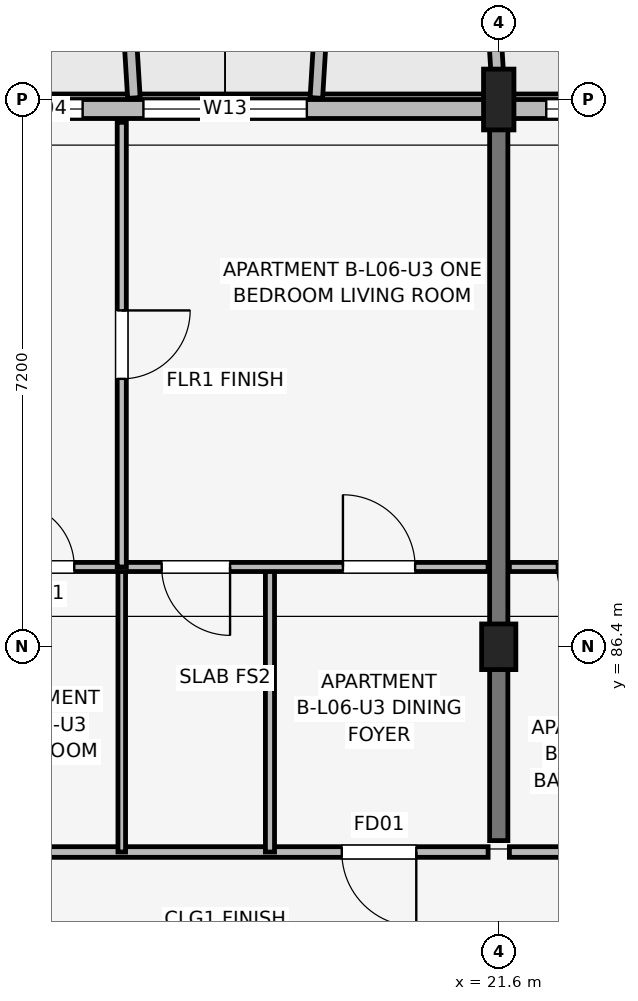
"""IFC4 building model, lengths in metres.
Left out: names, types, materials, properties, quantities, classifications, styles, units other than length and angle.
Written with IfcOpenShell. Run it as: python <this file> out.ifc"""

import sys

from ifc_helpers import new_model, si_unit, direction, frame, frame_2d, origin, origin_2d, place, context, subcontext, project, spatial, rectangle, extrude, element, fill, save


model = new_model("IFC4")
c1 = context("Model", 3, precision=1e-05, world=origin(), true_north=direction((0.0, 1.0)))
c2 = subcontext(c1, "Body", "Model", "MODEL_VIEW")
j1 = project(units=[si_unit("LENGTHUNIT", "METRE"), si_unit("PLANEANGLEUNIT", "RADIAN")], contexts=[c1])
p1 = place(None, origin())
s1 = spatial("IfcSite", under=j1, at=p1, CompositionType="ELEMENT")
p2 = place(p1, origin())
s2 = spatial("IfcBuilding", under=s1, at=p2, CompositionType="ELEMENT")
p3 = place(p2, frame((0.0, 0.0, 21.3)))
s3 = spatial("IfcBuildingStorey", under=s2, at=p3, CompositionType="ELEMENT", Elevation=21.3)
p4 = place(p3, frame((21.6, 86.4, 0.0), z_axis=(0.0, 0.0, 1.0), x_axis=(1.0, 0.0, 0.0)))
e1 = element("IfcColumn", 1, at=p4, inside=s3, PredefinedType="COLUMN", context=c2, shape_type="SweptSolid", body=[
    extrude(rectangle(XDim=0.45, YDim=0.6, at=origin_2d()), origin(), (0.0, 0.0, 1.0), 3.15),
])
p5 = place(p3, frame((21.6, 93.6, 0.0), z_axis=(0.0, 0.0, 1.0), x_axis=(1.0, 0.0, 0.0)))
e2 = element("IfcColumn", 2, at=p5, inside=s3, PredefinedType="COLUMN", context=c2, shape_type="SweptSolid", body=[
    extrude(rectangle(XDim=0.4, YDim=0.8, at=origin_2d()), origin(), (0.0, 0.0, 1.0), 3.15),
])
p6 = place(p3, frame((21.6, 83.85, 0.0), z_axis=(0.0, 0.0, 1.0), x_axis=(0.0, 1.0, 0.0)))
e3 = element("IfcWall", 3, at=p6, inside=s3, PredefinedType="SHEAR", context=c2, shape_type="SweptSolid", body=[
    extrude(rectangle(XDim=9.4, YDim=0.24, at=frame_2d((4.7, 0.0))), origin(), (0.0, 0.0, 1.0), 3.15),
])
p7 = place(p3, frame((32.8, 93.475, 0.0), z_axis=(0.0, 0.0, 1.0), x_axis=(-1.0, 0.0, 0.0)))
e4 = element("IfcWall", 4, at=p7, inside=s3, PredefinedType="SOLIDWALL", context=c2, shape_type="SweptSolid", body=[
    extrude(rectangle(XDim=29.6, YDim=0.25, at=frame_2d((14.8, 0.0))), origin(), (0.0, 0.0, 1.0), 2.43),
])
p8 = place(p7, frame((22.9, 0.0, 0.0), z_axis=(0.0, 0.0, 1.0), x_axis=(-1.0, 0.0, 0.0)))
e5 = element("IfcOpeningElement", 5, at=p8, cuts=e4, PredefinedType="OPENING", context=c2, shape_type="SweptSolid", body=[
    extrude(rectangle(XDim=1.8, YDim=2.15, at=frame_2d((0.9, 1.075))), frame((0.0, 0.135, 0.0), z_axis=(0.0, -1.0, 0.0), x_axis=(1.0, 0.0, 0.0)), (0.0, 0.0, 1.0), 0.27),
])
p9 = place(p7, frame((8.425, 0.0, 0.0), z_axis=(0.0, 0.0, 1.0), x_axis=(-1.0, 0.0, 0.0)))
e6 = element("IfcOpeningElement", 6, at=p9, cuts=e4, PredefinedType="OPENING", context=c2, shape_type="SweptSolid", body=[
    extrude(rectangle(XDim=1.65, YDim=2.15, at=frame_2d((0.825, 1.075))), frame((0.0, 0.135, 0.0), z_axis=(0.0, -1.0, 0.0), x_axis=(1.0, 0.0, 0.0)), (0.0, 0.0, 1.0), 0.27),
])
p10 = place(p7, frame((26.25, 0.0, 0.75)))
e7 = element("IfcOpeningElement", 7, at=p10, cuts=e4, PredefinedType="OPENING", context=c2, shape_type="SweptSolid", body=[
    extrude(rectangle(XDim=0.72, YDim=1.35, at=frame_2d((0.36, 0.675))), frame((0.0, 0.135, 0.0), z_axis=(0.0, -1.0, 0.0), x_axis=(1.0, 0.0, 0.0)), (0.0, 0.0, 1.0), 0.27),
])
p11 = place(p7, frame((24.065, 0.0, 0.75)))
e8 = element("IfcOpeningElement", 8, at=p11, cuts=e4, PredefinedType="OPENING", context=c2, shape_type="SweptSolid", body=[
    extrude(rectangle(XDim=0.85, YDim=1.4, at=frame_2d((0.425, 0.7))), frame((0.0, 0.135, 0.0), z_axis=(0.0, -1.0, 0.0), x_axis=(1.0, 0.0, 0.0)), (0.0, 0.0, 1.0), 0.27),
])
p12 = place(p7, frame((16.675, 0.0, 0.75)))
e9 = element("IfcOpeningElement", 9, at=p12, cuts=e4, PredefinedType="OPENING", context=c2, shape_type="SweptSolid", body=[
    extrude(rectangle(XDim=0.98, YDim=1.45, at=frame_2d((0.49, 0.725))), frame((0.0, 0.135, 0.0), z_axis=(0.0, -1.0, 0.0), x_axis=(1.0, 0.0, 0.0)), (0.0, 0.0, 1.0), 0.27),
])
p13 = place(p7, frame((13.725, 0.0, 0.67)))
e10 = element("IfcOpeningElement", 10, at=p13, cuts=e4, PredefinedType="OPENING", context=c2, shape_type="SweptSolid", body=[
    extrude(rectangle(XDim=2.15, YDim=1.65, at=frame_2d((1.075, 0.825))), frame((0.0, 0.135, 0.0), z_axis=(0.0, -1.0, 0.0), x_axis=(1.0, 0.0, 0.0)), (0.0, 0.0, 1.0), 0.27),
])
p14 = place(p7, frame((9.355, 0.0, 0.75)))
e11 = element("IfcOpeningElement", 11, at=p14, cuts=e4, PredefinedType="OPENING", context=c2, shape_type="SweptSolid", body=[
    extrude(rectangle(XDim=1.22, YDim=1.5, at=frame_2d((0.61, 0.75))), frame((0.0, 0.135, 0.0), z_axis=(0.0, -1.0, 0.0), x_axis=(1.0, 0.0, 0.0)), (0.0, 0.0, 1.0), 0.27),
])
p15 = place(p7, frame((1.89, 0.0, 0.7)))
e12 = element("IfcOpeningElement", 12, at=p15, cuts=e4, PredefinedType="OPENING", context=c2, shape_type="SweptSolid", body=[
    extrude(rectangle(XDim=1.58, YDim=1.6, at=frame_2d((0.79, 0.8))), frame((0.0, 0.135, 0.0), z_axis=(0.0, -1.0, 0.0), x_axis=(1.0, 0.0, 0.0)), (0.0, 0.0, 1.0), 0.27),
])
for number, where, z_axis, x_axis in (
    (13, (16.8, 93.62, 0.0), (0.0, 0.0, 1.0), (-0.061, 0.998, 0.0)),
    (14, (19.2, 93.62, 0.0), (0.0, 0.0, 1.0), (0.061, 0.998, 0.0)),
    (15, (21.6, 93.62, 0.0), (0.0, 0.0, 1.0), (-0.061, 0.998, 0.0)),
):
    element("IfcWall", number, at=place(p3, frame(where, z_axis=z_axis, x_axis=x_axis)), inside=s3, PredefinedType="ELEMENTEDWALL", context=c2, shape_type="SweptSolid", body=[
        extrude(rectangle(XDim=1.964, YDim=0.165, at=frame_2d((0.982, 0.0))), origin(), (0.0, 0.0, 1.0), 2.53),
    ])
p16 = place(p3, frame((14.54, 83.7, 0.0), z_axis=(0.0, 0.0, 1.0), x_axis=(1.0, 0.0, 0.0)))
e16 = element("IfcWall", 16, at=p16, inside=s3, PredefinedType="PARTITIONING", context=c2, shape_type="SweptSolid", body=[
    extrude(rectangle(XDim=6.92, YDim=0.14, at=frame_2d((3.46, 0.0))), origin(), (0.0, 0.0, 1.0), 2.38),
])
p17 = place(p16, frame((5.975, 0.0, 0.0), z_axis=(0.0, 0.0, 1.0), x_axis=(-1.0, 0.0, 0.0)))
e17 = element("IfcOpeningElement", 17, at=p17, cuts=e16, PredefinedType="OPENING", context=c2, shape_type="SweptSolid", body=[
    extrude(rectangle(XDim=0.98, YDim=2.1, at=frame_2d((0.49, 1.05))), frame((0.0, 0.08, 0.0), z_axis=(0.0, -1.0, 0.0), x_axis=(1.0, 0.0, 0.0)), (0.0, 0.0, 1.0), 0.16),
])
p18 = place(p3, frame((16.64, 83.7, 0.0), z_axis=(0.0, 0.0, 1.0), x_axis=(0.0, 1.0, 0.0)))
e18 = element("IfcWall", 18, at=p18, inside=s3, PredefinedType="PARTITIONING", context=c2, shape_type="SweptSolid", body=[
    extrude(rectangle(XDim=3.75, YDim=0.1, at=frame_2d((1.875, 0.0))), origin(), (0.0, 0.0, 1.0), 2.38),
])
p19 = place(p3, frame((18.59, 83.7, 0.0), z_axis=(0.0, 0.0, 1.0), x_axis=(0.0, 1.0, 0.0)))
e19 = element("IfcWall", 19, at=p19, inside=s3, PredefinedType="PARTITIONING", context=c2, shape_type="SweptSolid", body=[
    extrude(rectangle(XDim=3.75, YDim=0.12, at=frame_2d((1.875, 0.0))), origin(), (0.0, 0.0, 1.0), 2.38),
])
p20 = place(p3, frame((14.54, 87.45, 0.0), z_axis=(0.0, 0.0, 1.0), x_axis=(1.0, 0.0, 0.0)))
e20 = element("IfcWall", 20, at=p20, inside=s3, PredefinedType="PARTITIONING", context=c2, shape_type="SweptSolid", body=[
    extrude(rectangle(XDim=6.92, YDim=0.12, at=frame_2d((3.46, 0.0))), origin(), (0.0, 0.0, 1.0), 2.38),
])
p21 = place(p20, frame((0.625, 0.0, 0.0)))
e21 = element("IfcOpeningElement", 21, at=p21, cuts=e20, PredefinedType="OPENING", context=c2, shape_type="SweptSolid", body=[
    extrude(rectangle(XDim=0.85, YDim=2.08, at=frame_2d((0.425, 1.04))), frame((0.0, 0.07, 0.0), z_axis=(0.0, -1.0, 0.0), x_axis=(1.0, 0.0, 0.0)), (0.0, 0.0, 1.0), 0.14),
])
p22 = place(p20, frame((3.525, 0.0, 0.0), z_axis=(0.0, 0.0, 1.0), x_axis=(-1.0, 0.0, 0.0)))
e22 = element("IfcOpeningElement", 22, at=p22, cuts=e20, PredefinedType="OPENING", context=c2, shape_type="SweptSolid", body=[
    extrude(rectangle(XDim=0.9, YDim=2.08, at=frame_2d((0.45, 1.04))), frame((0.0, 0.07, 0.0), z_axis=(0.0, -1.0, 0.0), x_axis=(1.0, 0.0, 0.0)), (0.0, 0.0, 1.0), 0.14),
])
p23 = place(p20, frame((5.01, 0.0, 0.0)))
e23 = element("IfcOpeningElement", 23, at=p23, cuts=e20, PredefinedType="OPENING", context=c2, shape_type="SweptSolid", body=[
    extrude(rectangle(XDim=0.95, YDim=2.08, at=frame_2d((0.475, 1.04))), frame((0.0, 0.07, 0.0), z_axis=(0.0, -1.0, 0.0), x_axis=(1.0, 0.0, 0.0)), (0.0, 0.0, 1.0), 0.14),
])
p24 = place(p3, frame((16.64, 87.45, 0.0), z_axis=(0.0, 0.0, 1.0), x_axis=(0.0, 1.0, 0.0)))
e24 = element("IfcWall", 24, at=p24, inside=s3, PredefinedType="PARTITIONING", context=c2, shape_type="SweptSolid", body=[
    extrude(rectangle(XDim=5.85, YDim=0.12, at=frame_2d((2.925, 0.0))), origin(), (0.0, 0.0, 1.0), 2.38),
])
p25 = place(p24, frame((3.375, 0.0, 0.0), z_axis=(0.0, 0.0, 1.0), x_axis=(-1.0, 0.0, 0.0)))
e25 = element("IfcOpeningElement", 25, at=p25, cuts=e24, PredefinedType="OPENING", context=c2, shape_type="SweptSolid", body=[
    extrude(rectangle(XDim=0.9, YDim=2.08, at=frame_2d((0.45, 1.04))), frame((0.0, 0.07, 0.0), z_axis=(0.0, -1.0, 0.0), x_axis=(1.0, 0.0, 0.0)), (0.0, 0.0, 1.0), 0.14),
])
p26 = place(p3, frame((21.74, 83.7, 0.0), z_axis=(0.0, 0.0, 1.0), x_axis=(1.0, 0.0, 0.0)))
e26 = element("IfcWall", 26, at=p26, inside=s3, PredefinedType="PARTITIONING", context=c2, shape_type="SweptSolid", body=[
    extrude(rectangle(XDim=6.92, YDim=0.14, at=frame_2d((3.46, 0.0))), origin(), (0.0, 0.0, 1.0), 2.38),
])
p27 = place(p26, frame((5.145, 0.0, 0.0)))
e27 = element("IfcOpeningElement", 27, at=p27, cuts=e26, PredefinedType="OPENING", context=c2, shape_type="SweptSolid", body=[
    extrude(rectangle(XDim=0.98, YDim=2.1, at=frame_2d((0.49, 1.05))), frame((0.0, 0.08, 0.0), z_axis=(0.0, -1.0, 0.0), x_axis=(1.0, 0.0, 0.0)), (0.0, 0.0, 1.0), 0.16),
])
p28 = place(p3, frame((21.74, 87.45, 0.0), z_axis=(0.0, 0.0, 1.0), x_axis=(1.0, 0.0, 0.0)))
e28 = element("IfcWall", 28, at=p28, inside=s3, PredefinedType="PARTITIONING", context=c2, shape_type="SweptSolid", body=[
    extrude(rectangle(XDim=6.92, YDim=0.12, at=frame_2d((3.46, 0.0))), origin(), (0.0, 0.0, 1.0), 2.38),
])
p29 = place(p28, frame((1.475, 0.0, 0.0), z_axis=(0.0, 0.0, 1.0), x_axis=(-1.0, 0.0, 0.0)))
e29 = element("IfcOpeningElement", 29, at=p29, cuts=e28, PredefinedType="OPENING", context=c2, shape_type="SweptSolid", body=[
    extrude(rectangle(XDim=0.85, YDim=2.08, at=frame_2d((0.425, 1.04))), frame((0.0, 0.07, 0.0), z_axis=(0.0, -1.0, 0.0), x_axis=(1.0, 0.0, 0.0)), (0.0, 0.0, 1.0), 0.14),
])
p30 = place(p28, frame((2.775, 0.0, 0.0)))
e30 = element("IfcOpeningElement", 30, at=p30, cuts=e28, PredefinedType="OPENING", context=c2, shape_type="SweptSolid", body=[
    extrude(rectangle(XDim=0.9, YDim=2.08, at=frame_2d((0.45, 1.04))), frame((0.0, 0.07, 0.0), z_axis=(0.0, -1.0, 0.0), x_axis=(1.0, 0.0, 0.0)), (0.0, 0.0, 1.0), 0.14),
])
p31 = place(p28, frame((6.11, 0.0, 0.0), z_axis=(0.0, 0.0, 1.0), x_axis=(-1.0, 0.0, 0.0)))
e31 = element("IfcOpeningElement", 31, at=p31, cuts=e28, PredefinedType="OPENING", context=c2, shape_type="SweptSolid", body=[
    extrude(rectangle(XDim=0.95, YDim=2.08, at=frame_2d((0.475, 1.04))), frame((0.0, 0.07, 0.0), z_axis=(0.0, -1.0, 0.0), x_axis=(1.0, 0.0, 0.0)), (0.0, 0.0, 1.0), 0.14),
])
p32 = place(p12, origin())
e32 = element("IfcWindow", 32, at=p32, inside=s3, PartitioningType="SINGLE_PANEL", PredefinedType="WINDOW", context=c2, shape_type="SweptSolid", body=[
    extrude(rectangle(XDim=0.98, YDim=1.45, at=frame_2d((0.49, 0.725))), frame((0.0, 0.03, 0.0), z_axis=(0.0, -1.0, 0.0), x_axis=(1.0, 0.0, 0.0)), (0.0, 0.0, 1.0), 0.06),
])
fill(e9, e32)
p33 = place(p13, origin())
e33 = element("IfcWindow", 33, at=p33, inside=s3, PartitioningType="SINGLE_PANEL", PredefinedType="WINDOW", context=c2, shape_type="SweptSolid", body=[
    extrude(rectangle(XDim=2.15, YDim=1.65, at=frame_2d((1.075, 0.825))), frame((0.0, 0.03, 0.0), z_axis=(0.0, -1.0, 0.0), x_axis=(1.0, 0.0, 0.0)), (0.0, 0.0, 1.0), 0.06),
])
fill(e10, e33)
p34 = place(p14, origin())
e34 = element("IfcWindow", 34, at=p34, inside=s3, PartitioningType="SINGLE_PANEL", PredefinedType="WINDOW", context=c2, shape_type="SweptSolid", body=[
    extrude(rectangle(XDim=1.22, YDim=1.5, at=frame_2d((0.61, 0.75))), frame((0.0, 0.03, 0.0), z_axis=(0.0, -1.0, 0.0), x_axis=(1.0, 0.0, 0.0)), (0.0, 0.0, 1.0), 0.06),
])
fill(e11, e34)
p35 = place(p17, origin())
e35 = element("IfcDoor", 35, at=p35, inside=s3, OperationType="SINGLE_SWING_RIGHT", PredefinedType="DOOR", context=c2, shape_type="SweptSolid", body=[
    extrude(rectangle(XDim=0.98, YDim=2.1, at=frame_2d((0.49, 1.05))), frame((0.0, 0.025, 0.0), z_axis=(0.0, -1.0, 0.0), x_axis=(1.0, 0.0, 0.0)), (0.0, 0.0, 1.0), 0.05),
])
fill(e17, e35)
p36 = place(p21, origin())
e36 = element("IfcDoor", 36, at=p36, inside=s3, OperationType="SINGLE_SWING_LEFT", PredefinedType="DOOR", context=c2, shape_type="SweptSolid", body=[
    extrude(rectangle(XDim=0.85, YDim=2.08, at=frame_2d((0.425, 1.04))), frame((0.0, 0.025, 0.0), z_axis=(0.0, -1.0, 0.0), x_axis=(1.0, 0.0, 0.0)), (0.0, 0.0, 1.0), 0.05),
])
fill(e21, e36)
p37 = place(p22, origin())
e37 = element("IfcDoor", 37, at=p37, inside=s3, OperationType="SINGLE_SWING_RIGHT", PredefinedType="DOOR", context=c2, shape_type="SweptSolid", body=[
    extrude(rectangle(XDim=0.9, YDim=2.08, at=frame_2d((0.45, 1.04))), frame((0.0, 0.025, 0.0), z_axis=(0.0, -1.0, 0.0), x_axis=(1.0, 0.0, 0.0)), (0.0, 0.0, 1.0), 0.05),
])
fill(e22, e37)
p38 = place(p23, origin())
e38 = element("IfcDoor", 38, at=p38, inside=s3, OperationType="SINGLE_SWING_LEFT", PredefinedType="DOOR", context=c2, shape_type="SweptSolid", body=[
    extrude(rectangle(XDim=0.95, YDim=2.08, at=frame_2d((0.475, 1.04))), frame((0.0, 0.025, 0.0), z_axis=(0.0, -1.0, 0.0), x_axis=(1.0, 0.0, 0.0)), (0.0, 0.0, 1.0), 0.05),
])
fill(e23, e38)
p39 = place(p25, origin())
e39 = element("IfcDoor", 39, at=p39, inside=s3, OperationType="SINGLE_SWING_RIGHT", PredefinedType="DOOR", context=c2, shape_type="SweptSolid", body=[
    extrude(rectangle(XDim=0.9, YDim=2.08, at=frame_2d((0.45, 1.04))), frame((0.0, 0.025, 0.0), z_axis=(0.0, -1.0, 0.0), x_axis=(1.0, 0.0, 0.0)), (0.0, 0.0, 1.0), 0.05),
])
fill(e25, e39)
p40 = place(p29, origin())
e40 = element("IfcDoor", 40, at=p40, inside=s3, OperationType="SINGLE_SWING_RIGHT", PredefinedType="DOOR", context=c2, shape_type="SweptSolid", body=[
    extrude(rectangle(XDim=0.85, YDim=2.08, at=frame_2d((0.425, 1.04))), frame((0.0, 0.025, 0.0), z_axis=(0.0, -1.0, 0.0), x_axis=(1.0, 0.0, 0.0)), (0.0, 0.0, 1.0), 0.05),
])
fill(e29, e40)
save(model, sys.argv[1])
